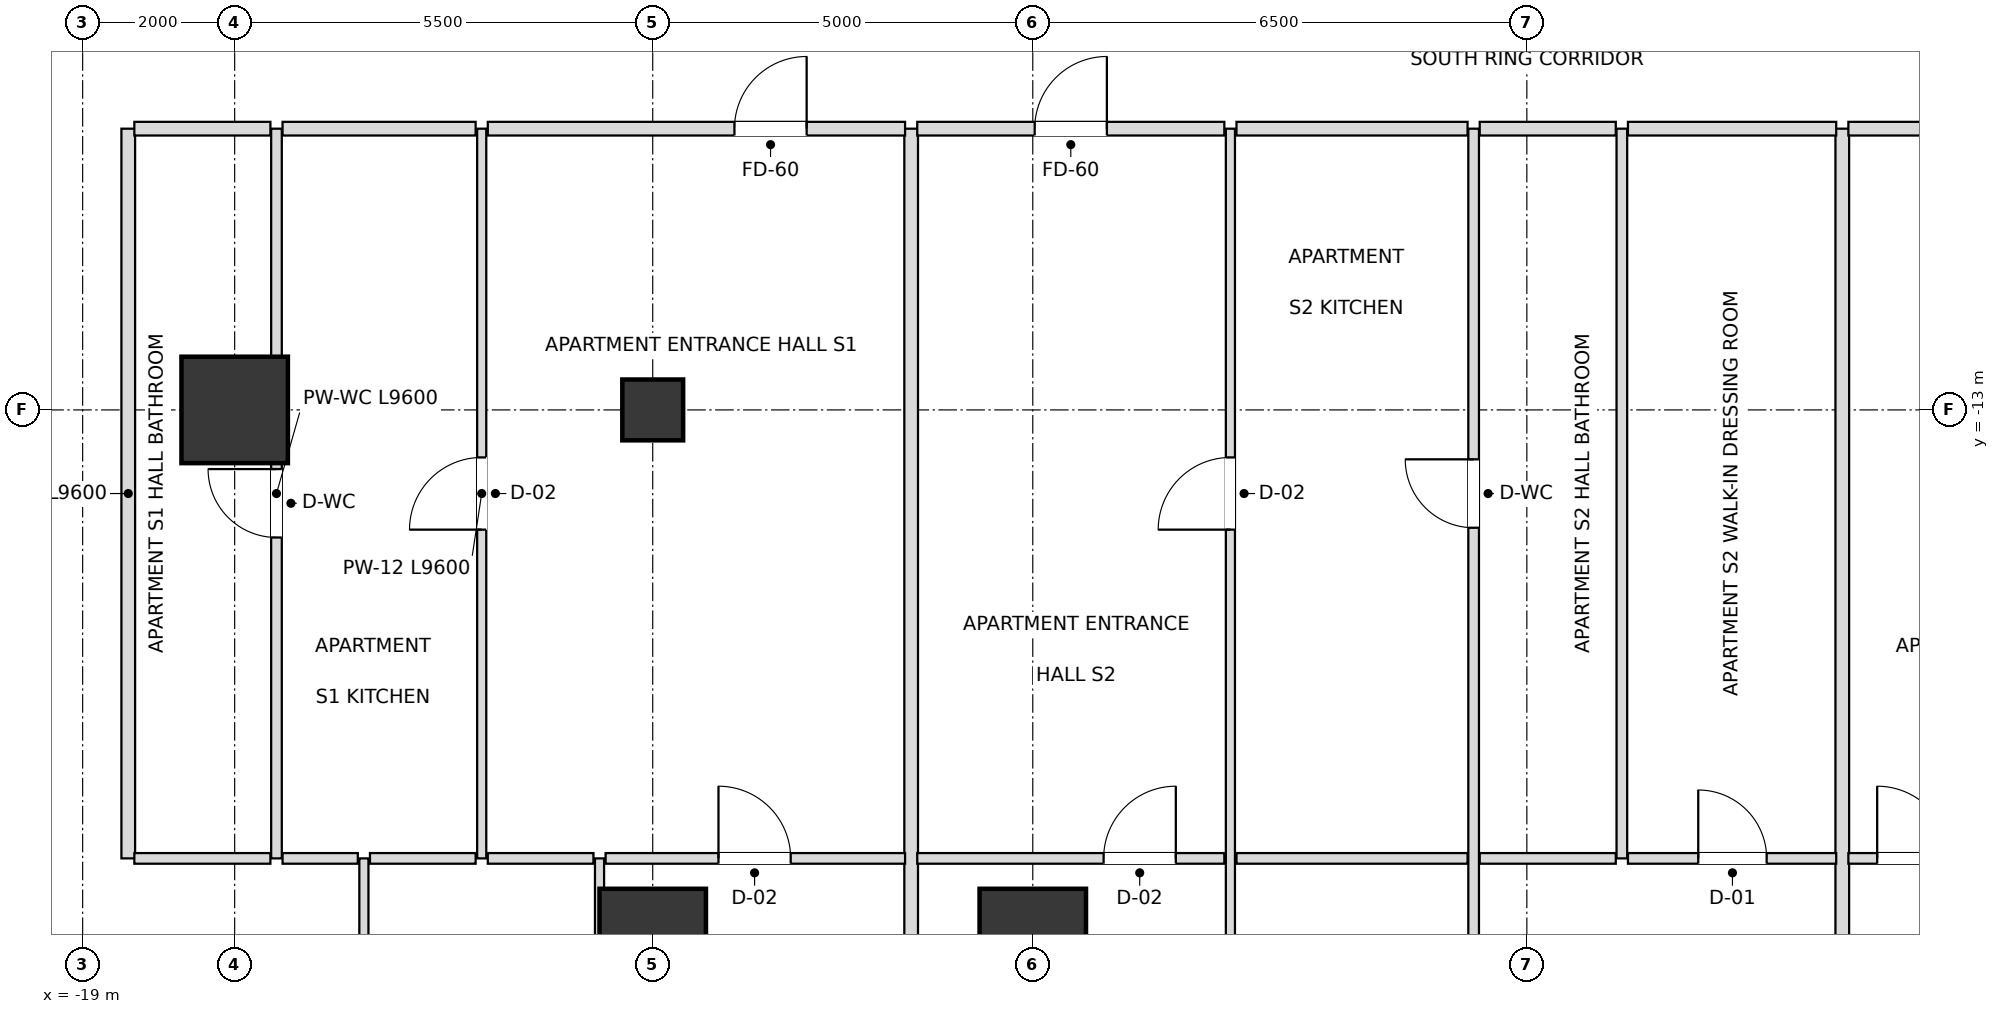
"""IFC4 building model, lengths in metres.
Left out: names, types, materials, properties, quantities, classifications, styles, units other than length and angle.
Written with IfcOpenShell. Run it as: python <this file> out.ifc"""

import sys

from ifc_helpers import new_model, si_unit, direction, frame, frame_2d, origin, origin_2d, place, context, subcontext, project, spatial, rectangle, extrude, element, fill, save


model = new_model("IFC4")
c1 = context("Model", 3, precision=1e-05, world=origin(), true_north=direction((0.0, 1.0)))
c2 = subcontext(c1, "Body", "Model", "MODEL_VIEW")
j1 = project(units=[si_unit("LENGTHUNIT", "METRE"), si_unit("PLANEANGLEUNIT", "RADIAN")], contexts=[c1])
p1 = place(None, origin())
s1 = spatial("IfcSite", under=j1, at=p1, CompositionType="ELEMENT")
p2 = place(p1, origin())
s2 = spatial("IfcBuilding", under=s1, at=p2, CompositionType="ELEMENT")
p3 = place(p2, frame((0.0, 0.0, 90.0)))
s3 = spatial("IfcBuildingStorey", under=s2, at=p3, CompositionType="ELEMENT", Elevation=90.0)
for number, where, z_axis, x_axis in (
    (1, (-11.5, -20.0, 0.0), (0.0, 0.0, 1.0), (1.0, 0.0, 0.0)),
    (2, (-6.5, -20.0, 0.0), (0.0, 0.0, 1.0), (1.0, 0.0, 0.0)),
    (3, (-17.0, -13.0, 0.0), (0.0, 0.0, 1.0), (1.0, 0.0, 0.0)),
):
    element("IfcColumn", number, at=place(p3, frame(where, z_axis=z_axis, x_axis=x_axis)), inside=s3, PredefinedType="USERDEFINED", context=c2, shape_type="SweptSolid", body=[
        extrude(rectangle(XDim=1.4, YDim=1.4, at=origin_2d()), origin(), (0.0, 0.0, 1.0), 3.6),
    ])
p4 = place(p3, frame((-11.5, -13.0, 0.0), z_axis=(0.0, 0.0, 1.0), x_axis=(1.0, 0.0, 0.0)))
e4 = element("IfcColumn", 4, at=p4, inside=s3, PredefinedType="COLUMN", context=c2, shape_type="SweptSolid", body=[
    extrude(rectangle(XDim=0.8, YDim=0.8, at=origin_2d()), origin(), (0.0, 0.0, 1.0), 3.6),
])
p5 = place(p3, frame((-18.4, -18.9, 0.0), z_axis=(0.0, 0.0, 1.0), x_axis=(0.0, 1.0, 0.0)))
e5 = element("IfcWall", 5, at=p5, inside=s3, PredefinedType="PARTITIONING", context=c2, shape_type="SweptSolid", body=[
    extrude(rectangle(XDim=9.6, YDim=0.18, at=frame_2d((4.8, 0.0))), origin(), (0.0, 0.0, 1.0), 2.59),
])
p6 = place(p3, frame((-16.45, -18.9, 0.0), z_axis=(0.0, 0.0, 1.0), x_axis=(0.0, 1.0, 0.0)))
e6 = element("IfcWall", 6, at=p6, inside=s3, PredefinedType="PARTITIONING", context=c2, shape_type="SweptSolid", body=[
    extrude(rectangle(XDim=9.6, YDim=0.14, at=frame_2d((4.8, 0.0))), origin(), (0.0, 0.0, 1.0), 2.59),
])
p7 = place(p6, frame((4.222, 0.0, 0.0)))
e7 = element("IfcOpeningElement", 7, at=p7, cuts=e6, PredefinedType="OPENING", context=c2, shape_type="SweptSolid", body=[
    extrude(rectangle(XDim=0.9, YDim=2.1, at=frame_2d((0.45, 1.05))), frame((0.0, 0.08, 0.0), z_axis=(0.0, -1.0, 0.0), x_axis=(1.0, 0.0, 0.0)), (0.0, 0.0, 1.0), 0.16),
])
p8 = place(p3, frame((-15.3, -24.9, 0.0), z_axis=(0.0, 0.0, 1.0), x_axis=(0.0, 1.0, 0.0)))
e8 = element("IfcWall", 8, at=p8, inside=s3, PredefinedType="PARTITIONING", context=c2, shape_type="SweptSolid", body=[
    extrude(rectangle(XDim=6.0, YDim=0.12, at=frame_2d((3.0, 0.0))), origin(), (0.0, 0.0, 1.0), 2.59),
])
p9 = place(p8, frame((2.55, 0.0, 0.0)))
e9 = element("IfcOpeningElement", 9, at=p9, cuts=e8, PredefinedType="OPENING", context=c2, shape_type="SweptSolid", body=[
    extrude(rectangle(XDim=0.9, YDim=2.1, at=frame_2d((0.45, 1.05))), frame((0.0, 0.07, 0.0), z_axis=(0.0, -1.0, 0.0), x_axis=(1.0, 0.0, 0.0)), (0.0, 0.0, 1.0), 0.14),
])
p10 = place(p3, frame((-13.75, -18.9, 0.0), z_axis=(0.0, 0.0, 1.0), x_axis=(0.0, 1.0, 0.0)))
e10 = element("IfcWall", 10, at=p10, inside=s3, PredefinedType="PARTITIONING", context=c2, shape_type="SweptSolid", body=[
    extrude(rectangle(XDim=9.6, YDim=0.12, at=frame_2d((4.8, 0.0))), origin(), (0.0, 0.0, 1.0), 2.59),
])
p11 = place(p10, frame((4.325, 0.0, 0.0)))
e11 = element("IfcOpeningElement", 11, at=p11, cuts=e10, PredefinedType="OPENING", context=c2, shape_type="SweptSolid", body=[
    extrude(rectangle(XDim=0.95, YDim=2.1, at=frame_2d((0.475, 1.05))), frame((0.0, 0.07, 0.0), z_axis=(0.0, -1.0, 0.0), x_axis=(1.0, 0.0, 0.0)), (0.0, 0.0, 1.0), 0.14),
])
p12 = place(p3, frame((-12.2, -24.9, 0.0), z_axis=(0.0, 0.0, 1.0), x_axis=(0.0, 1.0, 0.0)))
e12 = element("IfcWall", 12, at=p12, inside=s3, PredefinedType="PARTITIONING", context=c2, shape_type="SweptSolid", body=[
    extrude(rectangle(XDim=6.0, YDim=0.12, at=frame_2d((3.0, 0.0))), origin(), (0.0, 0.0, 1.0), 2.59),
])
p13 = place(p12, frame((2.55, 0.0, 0.0)))
e13 = element("IfcOpeningElement", 13, at=p13, cuts=e12, PredefinedType="OPENING", context=c2, shape_type="SweptSolid", body=[
    extrude(rectangle(XDim=0.9, YDim=2.1, at=frame_2d((0.45, 1.05))), frame((0.0, 0.07, 0.0), z_axis=(0.0, -1.0, 0.0), x_axis=(1.0, 0.0, 0.0)), (0.0, 0.0, 1.0), 0.14),
])
p14 = place(p3, frame((-8.1, -24.9, 0.0), z_axis=(0.0, 0.0, 1.0), x_axis=(0.0, 1.0, 0.0)))
e14 = element("IfcWall", 14, at=p14, inside=s3, PredefinedType="PARTITIONING", context=c2, shape_type="SweptSolid", body=[
    extrude(rectangle(XDim=15.6, YDim=0.18, at=frame_2d((7.8, 0.0))), origin(), (0.0, 0.0, 1.0), 2.736),
])
p15 = place(p3, frame((-3.9, -24.9, 0.0), z_axis=(0.0, 0.0, 1.0), x_axis=(0.0, 1.0, 0.0)))
e15 = element("IfcWall", 15, at=p15, inside=s3, PredefinedType="PARTITIONING", context=c2, shape_type="SweptSolid", body=[
    extrude(rectangle(XDim=15.6, YDim=0.12, at=frame_2d((7.8, 0.0))), origin(), (0.0, 0.0, 1.0), 2.736),
])
p16 = place(p15, frame((10.325, 0.0, 0.0)))
e16 = element("IfcOpeningElement", 16, at=p16, cuts=e15, PredefinedType="OPENING", context=c2, shape_type="SweptSolid", body=[
    extrude(rectangle(XDim=0.95, YDim=2.1, at=frame_2d((0.475, 1.05))), frame((0.0, 0.07, 0.0), z_axis=(0.0, -1.0, 0.0), x_axis=(1.0, 0.0, 0.0)), (0.0, 0.0, 1.0), 0.14),
])
p17 = place(p15, frame((2.55, 0.0, 0.0)))
e17 = element("IfcOpeningElement", 17, at=p17, cuts=e15, PredefinedType="OPENING", context=c2, shape_type="SweptSolid", body=[
    extrude(rectangle(XDim=0.9, YDim=2.1, at=frame_2d((0.45, 1.05))), frame((0.0, 0.07, 0.0), z_axis=(0.0, -1.0, 0.0), x_axis=(1.0, 0.0, 0.0)), (0.0, 0.0, 1.0), 0.14),
])
p18 = place(p3, frame((-0.7, -24.9, 0.0), z_axis=(0.0, 0.0, 1.0), x_axis=(0.0, 1.0, 0.0)))
e18 = element("IfcWall", 18, at=p18, inside=s3, PredefinedType="PARTITIONING", context=c2, shape_type="SweptSolid", body=[
    extrude(rectangle(XDim=15.6, YDim=0.14, at=frame_2d((7.8, 0.0))), origin(), (0.0, 0.0, 1.0), 2.736),
])
p19 = place(p18, frame((10.35, 0.0, 0.0)))
e19 = element("IfcOpeningElement", 19, at=p19, cuts=e18, PredefinedType="OPENING", context=c2, shape_type="SweptSolid", body=[
    extrude(rectangle(XDim=0.9, YDim=2.1, at=frame_2d((0.45, 1.05))), frame((0.0, 0.08, 0.0), z_axis=(0.0, -1.0, 0.0), x_axis=(1.0, 0.0, 0.0)), (0.0, 0.0, 1.0), 0.16),
])
p20 = place(p18, frame((2.55, 0.0, 0.0)))
e20 = element("IfcOpeningElement", 20, at=p20, cuts=e18, PredefinedType="OPENING", context=c2, shape_type="SweptSolid", body=[
    extrude(rectangle(XDim=0.9, YDim=2.1, at=frame_2d((0.45, 1.05))), frame((0.0, 0.08, 0.0), z_axis=(0.0, -1.0, 0.0), x_axis=(1.0, 0.0, 0.0)), (0.0, 0.0, 1.0), 0.16),
])
p21 = place(p3, frame((1.25, -18.9, 0.0), z_axis=(0.0, 0.0, 1.0), x_axis=(0.0, 1.0, 0.0)))
e21 = element("IfcWall", 21, at=p21, inside=s3, PredefinedType="PARTITIONING", context=c2, shape_type="SweptSolid", body=[
    extrude(rectangle(XDim=9.6, YDim=0.14, at=frame_2d((4.8, 0.0))), origin(), (0.0, 0.0, 1.0), 2.868),
])
p22 = place(p3, frame((4.15, -24.9, 0.0), z_axis=(0.0, 0.0, 1.0), x_axis=(0.0, 1.0, 0.0)))
e22 = element("IfcWall", 22, at=p22, inside=s3, PredefinedType="PARTITIONING", context=c2, shape_type="SweptSolid", body=[
    extrude(rectangle(XDim=15.6, YDim=0.18, at=frame_2d((7.8, 0.0))), origin(), (0.0, 0.0, 1.0), 2.736),
])
p23 = place(p3, frame((-18.32, -18.9, 0.0), z_axis=(0.0, 0.0, 1.0), x_axis=(1.0, 0.0, 0.0)))
e23 = element("IfcWall", 23, at=p23, inside=s3, PredefinedType="PARTITIONING", context=c2, shape_type="SweptSolid", body=[
    extrude(rectangle(XDim=1.79, YDim=0.14, at=frame_2d((0.895, 0.0))), origin(), (0.0, 0.0, 1.0), 2.59),
])
p24 = place(p3, frame((-16.37, -18.9, 0.0), z_axis=(0.0, 0.0, 1.0), x_axis=(1.0, 0.0, 0.0)))
e24 = element("IfcWall", 24, at=p24, inside=s3, PredefinedType="PARTITIONING", context=c2, shape_type="SweptSolid", body=[
    extrude(rectangle(XDim=0.99, YDim=0.14, at=frame_2d((0.495, 0.0))), origin(), (0.0, 0.0, 1.0), 2.59),
])
for number, where, z_axis, x_axis in (
    (25, (-15.22, -18.9, 0.0), (0.0, 0.0, 1.0), (1.0, 0.0, 0.0)),
    (26, (-13.67, -18.9, 0.0), (0.0, 0.0, 1.0), (1.0, 0.0, 0.0)),
):
    element("IfcWall", number, at=place(p3, frame(where, z_axis=z_axis, x_axis=x_axis)), inside=s3, PredefinedType="PARTITIONING", context=c2, shape_type="SweptSolid", body=[
        extrude(rectangle(XDim=1.39, YDim=0.14, at=frame_2d((0.695, 0.0))), origin(), (0.0, 0.0, 1.0), 2.59),
    ])
p25 = place(p3, frame((-12.12, -18.9, 0.0), z_axis=(0.0, 0.0, 1.0), x_axis=(1.0, 0.0, 0.0)))
e27 = element("IfcWall", 27, at=p25, inside=s3, PredefinedType="PARTITIONING", context=c2, shape_type="SweptSolid", body=[
    extrude(rectangle(XDim=3.94, YDim=0.14, at=frame_2d((1.97, 0.0))), origin(), (0.0, 0.0, 1.0), 2.59),
])
p26 = place(p25, frame((1.485, 0.0, 0.0)))
e28 = element("IfcOpeningElement", 28, at=p26, cuts=e27, PredefinedType="OPENING", context=c2, shape_type="SweptSolid", body=[
    extrude(rectangle(XDim=0.95, YDim=2.1, at=frame_2d((0.475, 1.05))), frame((0.0, 0.08, 0.0), z_axis=(0.0, -1.0, 0.0), x_axis=(1.0, 0.0, 0.0)), (0.0, 0.0, 1.0), 0.16),
])
p27 = place(p3, frame((-8.02, -18.9, 0.0), z_axis=(0.0, 0.0, 1.0), x_axis=(1.0, 0.0, 0.0)))
e29 = element("IfcWall", 29, at=p27, inside=s3, PredefinedType="PARTITIONING", context=c2, shape_type="SweptSolid", body=[
    extrude(rectangle(XDim=4.04, YDim=0.14, at=frame_2d((2.02, 0.0))), origin(), (0.0, 0.0, 1.0), 2.736),
])
p28 = place(p27, frame((2.452, 0.0, 0.0)))
e30 = element("IfcOpeningElement", 30, at=p28, cuts=e29, PredefinedType="OPENING", context=c2, shape_type="SweptSolid", body=[
    extrude(rectangle(XDim=0.95, YDim=2.1, at=frame_2d((0.475, 1.05))), frame((0.0, 0.08, 0.0), z_axis=(0.0, -1.0, 0.0), x_axis=(1.0, 0.0, 0.0)), (0.0, 0.0, 1.0), 0.16),
])
p29 = place(p3, frame((-3.82, -18.9, 0.0), z_axis=(0.0, 0.0, 1.0), x_axis=(1.0, 0.0, 0.0)))
e31 = element("IfcWall", 31, at=p29, inside=s3, PredefinedType="PARTITIONING", context=c2, shape_type="SweptSolid", body=[
    extrude(rectangle(XDim=3.04, YDim=0.14, at=frame_2d((1.52, 0.0))), origin(), (0.0, 0.0, 1.0), 3.3),
])
p30 = place(p3, frame((-0.62, -18.9, 0.0), z_axis=(0.0, 0.0, 1.0), x_axis=(1.0, 0.0, 0.0)))
e32 = element("IfcWall", 32, at=p30, inside=s3, PredefinedType="PARTITIONING", context=c2, shape_type="SweptSolid", body=[
    extrude(rectangle(XDim=1.79, YDim=0.14, at=frame_2d((0.895, 0.0))), origin(), (0.0, 0.0, 1.0), 3.3),
])
p31 = place(p3, frame((1.33, -18.9, 0.0), z_axis=(0.0, 0.0, 1.0), x_axis=(1.0, 0.0, 0.0)))
e33 = element("IfcWall", 33, at=p31, inside=s3, PredefinedType="PARTITIONING", context=c2, shape_type="SweptSolid", body=[
    extrude(rectangle(XDim=2.74, YDim=0.14, at=frame_2d((1.37, 0.0))), origin(), (0.0, 0.0, 1.0), 3.3),
])
p32 = place(p31, frame((0.925, 0.0, 0.0)))
e34 = element("IfcOpeningElement", 34, at=p32, cuts=e33, PredefinedType="OPENING", context=c2, shape_type="SweptSolid", body=[
    extrude(rectangle(XDim=0.9, YDim=2.1, at=frame_2d((0.45, 1.05))), frame((0.0, 0.08, 0.0), z_axis=(0.0, -1.0, 0.0), x_axis=(1.0, 0.0, 0.0)), (0.0, 0.0, 1.0), 0.16),
])
p33 = place(p3, frame((4.23, -18.9, 0.0), z_axis=(0.0, 0.0, 1.0), x_axis=(1.0, 0.0, 0.0)))
e35 = element("IfcWall", 35, at=p33, inside=s3, PredefinedType="PARTITIONING", context=c2, shape_type="SweptSolid", body=[
    extrude(rectangle(XDim=4.04, YDim=0.14, at=frame_2d((2.02, 0.0))), origin(), (0.0, 0.0, 1.0), 2.736),
])
p34 = place(p33, frame((0.379, 0.0, 0.0)))
e36 = element("IfcOpeningElement", 36, at=p34, cuts=e35, PredefinedType="OPENING", context=c2, shape_type="SweptSolid", body=[
    extrude(rectangle(XDim=0.95, YDim=2.1, at=frame_2d((0.475, 1.05))), frame((0.0, 0.08, 0.0), z_axis=(0.0, -1.0, 0.0), x_axis=(1.0, 0.0, 0.0)), (0.0, 0.0, 1.0), 0.16),
])
p35 = place(p3, frame((-18.32, -9.3, 0.0), z_axis=(0.0, 0.0, 1.0), x_axis=(1.0, 0.0, 0.0)))
e37 = element("IfcWall", 37, at=p35, inside=s3, PredefinedType="PARTITIONING", context=c2, shape_type="SweptSolid", body=[
    extrude(rectangle(XDim=1.79, YDim=0.18, at=frame_2d((0.895, 0.0))), origin(), (0.0, 0.0, 1.0), 2.736),
])
p36 = place(p3, frame((-16.37, -9.3, 0.0), z_axis=(0.0, 0.0, 1.0), x_axis=(1.0, 0.0, 0.0)))
e38 = element("IfcWall", 38, at=p36, inside=s3, PredefinedType="PARTITIONING", context=c2, shape_type="SweptSolid", body=[
    extrude(rectangle(XDim=2.54, YDim=0.18, at=frame_2d((1.27, 0.0))), origin(), (0.0, 0.0, 1.0), 3.3),
])
p37 = place(p3, frame((-13.67, -9.3, 0.0), z_axis=(0.0, 0.0, 1.0), x_axis=(1.0, 0.0, 0.0)))
e39 = element("IfcWall", 39, at=p37, inside=s3, PredefinedType="PARTITIONING", context=c2, shape_type="SweptSolid", body=[
    extrude(rectangle(XDim=5.49, YDim=0.18, at=frame_2d((2.745, 0.0))), origin(), (0.0, 0.0, 1.0), 3.3),
])
p38 = place(p37, frame((3.245, 0.0, 0.0)))
e40 = element("IfcOpeningElement", 40, at=p38, cuts=e39, PredefinedType="OPENING", context=c2, shape_type="SweptSolid", body=[
    extrude(rectangle(XDim=0.95, YDim=2.15, at=frame_2d((0.475, 1.075))), frame((0.0, 0.1, 0.0), z_axis=(0.0, -1.0, 0.0), x_axis=(1.0, 0.0, 0.0)), (0.0, 0.0, 1.0), 0.2),
])
p39 = place(p3, frame((-8.02, -9.3, 0.0), z_axis=(0.0, 0.0, 1.0), x_axis=(1.0, 0.0, 0.0)))
e41 = element("IfcWall", 41, at=p39, inside=s3, PredefinedType="PARTITIONING", context=c2, shape_type="SweptSolid", body=[
    extrude(rectangle(XDim=4.04, YDim=0.18, at=frame_2d((2.02, 0.0))), origin(), (0.0, 0.0, 1.0), 2.736),
])
p40 = place(p39, frame((1.545, 0.0, 0.0)))
e42 = element("IfcOpeningElement", 42, at=p40, cuts=e41, PredefinedType="OPENING", context=c2, shape_type="SweptSolid", body=[
    extrude(rectangle(XDim=0.95, YDim=2.15, at=frame_2d((0.475, 1.075))), frame((0.0, 0.1, 0.0), z_axis=(0.0, -1.0, 0.0), x_axis=(1.0, 0.0, 0.0)), (0.0, 0.0, 1.0), 0.2),
])
p41 = place(p3, frame((-3.82, -9.3, 0.0), z_axis=(0.0, 0.0, 1.0), x_axis=(1.0, 0.0, 0.0)))
e43 = element("IfcWall", 43, at=p41, inside=s3, PredefinedType="PARTITIONING", context=c2, shape_type="SweptSolid", body=[
    extrude(rectangle(XDim=3.04, YDim=0.18, at=frame_2d((1.52, 0.0))), origin(), (0.0, 0.0, 1.0), 3.3),
])
p42 = place(p3, frame((-0.62, -9.3, 0.0), z_axis=(0.0, 0.0, 1.0), x_axis=(1.0, 0.0, 0.0)))
e44 = element("IfcWall", 44, at=p42, inside=s3, PredefinedType="PARTITIONING", context=c2, shape_type="SweptSolid", body=[
    extrude(rectangle(XDim=1.79, YDim=0.18, at=frame_2d((0.895, 0.0))), origin(), (0.0, 0.0, 1.0), 3.3),
])
p43 = place(p3, frame((1.33, -9.3, 0.0), z_axis=(0.0, 0.0, 1.0), x_axis=(1.0, 0.0, 0.0)))
e45 = element("IfcWall", 45, at=p43, inside=s3, PredefinedType="PARTITIONING", context=c2, shape_type="SweptSolid", body=[
    extrude(rectangle(XDim=2.74, YDim=0.18, at=frame_2d((1.37, 0.0))), origin(), (0.0, 0.0, 1.0), 3.3),
])
p44 = place(p3, frame((4.23, -9.3, 0.0), z_axis=(0.0, 0.0, 1.0), x_axis=(1.0, 0.0, 0.0)))
e46 = element("IfcWall", 46, at=p44, inside=s3, PredefinedType="PARTITIONING", context=c2, shape_type="SweptSolid", body=[
    extrude(rectangle(XDim=4.04, YDim=0.18, at=frame_2d((2.02, 0.0))), origin(), (0.0, 0.0, 1.0), 2.736),
])
p45 = place(p44, frame((1.565, 0.0, 0.0)))
e47 = element("IfcOpeningElement", 47, at=p45, cuts=e46, PredefinedType="OPENING", context=c2, shape_type="SweptSolid", body=[
    extrude(rectangle(XDim=0.95, YDim=2.15, at=frame_2d((0.475, 1.075))), frame((0.0, 0.1, 0.0), z_axis=(0.0, -1.0, 0.0), x_axis=(1.0, 0.0, 0.0)), (0.0, 0.0, 1.0), 0.2),
])
p46 = place(p38, origin())
e48 = element("IfcDoor", 48, at=p46, inside=s3, OperationType="SINGLE_SWING_RIGHT", PredefinedType="DOOR", context=c2, shape_type="SweptSolid", body=[
    extrude(rectangle(XDim=0.95, YDim=2.15, at=frame_2d((0.475, 1.075))), frame((0.0, 0.025, 0.0), z_axis=(0.0, -1.0, 0.0), x_axis=(1.0, 0.0, 0.0)), (0.0, 0.0, 1.0), 0.05),
])
fill(e40, e48)
p47 = place(p11, origin())
e49 = element("IfcDoor", 49, at=p47, inside=s3, OperationType="SINGLE_SWING_LEFT", PredefinedType="DOOR", context=c2, shape_type="SweptSolid", body=[
    extrude(rectangle(XDim=0.95, YDim=2.1, at=frame_2d((0.475, 1.05))), frame((0.0, 0.025, 0.0), z_axis=(0.0, -1.0, 0.0), x_axis=(1.0, 0.0, 0.0)), (0.0, 0.0, 1.0), 0.05),
])
fill(e11, e49)
p48 = place(p7, origin())
e50 = element("IfcDoor", 50, at=p48, inside=s3, OperationType="SINGLE_SWING_RIGHT", PredefinedType="DOOR", context=c2, shape_type="SweptSolid", body=[
    extrude(rectangle(XDim=0.9, YDim=2.1, at=frame_2d((0.45, 1.05))), frame((0.0, 0.025, 0.0), z_axis=(0.0, -1.0, 0.0), x_axis=(1.0, 0.0, 0.0)), (0.0, 0.0, 1.0), 0.05),
])
fill(e7, e50)
p49 = place(p26, origin())
e51 = element("IfcDoor", 51, at=p49, inside=s3, OperationType="SINGLE_SWING_LEFT", PredefinedType="DOOR", context=c2, shape_type="SweptSolid", body=[
    extrude(rectangle(XDim=0.95, YDim=2.1, at=frame_2d((0.475, 1.05))), frame((0.0, 0.025, 0.0), z_axis=(0.0, -1.0, 0.0), x_axis=(1.0, 0.0, 0.0)), (0.0, 0.0, 1.0), 0.05),
])
fill(e28, e51)
p50 = place(p40, origin())
e52 = element("IfcDoor", 52, at=p50, inside=s3, OperationType="SINGLE_SWING_RIGHT", PredefinedType="DOOR", context=c2, shape_type="SweptSolid", body=[
    extrude(rectangle(XDim=0.95, YDim=2.15, at=frame_2d((0.475, 1.075))), frame((0.0, 0.025, 0.0), z_axis=(0.0, -1.0, 0.0), x_axis=(1.0, 0.0, 0.0)), (0.0, 0.0, 1.0), 0.05),
])
fill(e42, e52)
p51 = place(p16, origin())
e53 = element("IfcDoor", 53, at=p51, inside=s3, OperationType="SINGLE_SWING_LEFT", PredefinedType="DOOR", context=c2, shape_type="SweptSolid", body=[
    extrude(rectangle(XDim=0.95, YDim=2.1, at=frame_2d((0.475, 1.05))), frame((0.0, 0.025, 0.0), z_axis=(0.0, -1.0, 0.0), x_axis=(1.0, 0.0, 0.0)), (0.0, 0.0, 1.0), 0.05),
])
fill(e16, e53)
p52 = place(p19, origin())
e54 = element("IfcDoor", 54, at=p52, inside=s3, OperationType="SINGLE_SWING_RIGHT", PredefinedType="DOOR", context=c2, shape_type="SweptSolid", body=[
    extrude(rectangle(XDim=0.9, YDim=2.1, at=frame_2d((0.45, 1.05))), frame((0.0, 0.025, 0.0), z_axis=(0.0, -1.0, 0.0), x_axis=(1.0, 0.0, 0.0)), (0.0, 0.0, 1.0), 0.05),
])
fill(e19, e54)
p53 = place(p32, origin())
e55 = element("IfcDoor", 55, at=p53, inside=s3, OperationType="SINGLE_SWING_LEFT", PredefinedType="DOOR", context=c2, shape_type="SweptSolid", body=[
    extrude(rectangle(XDim=0.9, YDim=2.1, at=frame_2d((0.45, 1.05))), frame((0.0, 0.025, 0.0), z_axis=(0.0, -1.0, 0.0), x_axis=(1.0, 0.0, 0.0)), (0.0, 0.0, 1.0), 0.05),
])
fill(e34, e55)
p54 = place(p28, origin())
e56 = element("IfcDoor", 56, at=p54, inside=s3, OperationType="SINGLE_SWING_RIGHT", PredefinedType="DOOR", context=c2, shape_type="SweptSolid", body=[
    extrude(rectangle(XDim=0.95, YDim=2.1, at=frame_2d((0.475, 1.05))), frame((0.0, 0.025, 0.0), z_axis=(0.0, -1.0, 0.0), x_axis=(1.0, 0.0, 0.0)), (0.0, 0.0, 1.0), 0.05),
])
fill(e30, e56)
p55 = place(p34, origin())
e57 = element("IfcDoor", 57, at=p55, inside=s3, OperationType="SINGLE_SWING_LEFT", PredefinedType="DOOR", context=c2, shape_type="SweptSolid", body=[
    extrude(rectangle(XDim=0.95, YDim=2.1, at=frame_2d((0.475, 1.05))), frame((0.0, 0.025, 0.0), z_axis=(0.0, -1.0, 0.0), x_axis=(1.0, 0.0, 0.0)), (0.0, 0.0, 1.0), 0.05),
])
fill(e36, e57)
save(model, sys.argv[1])
